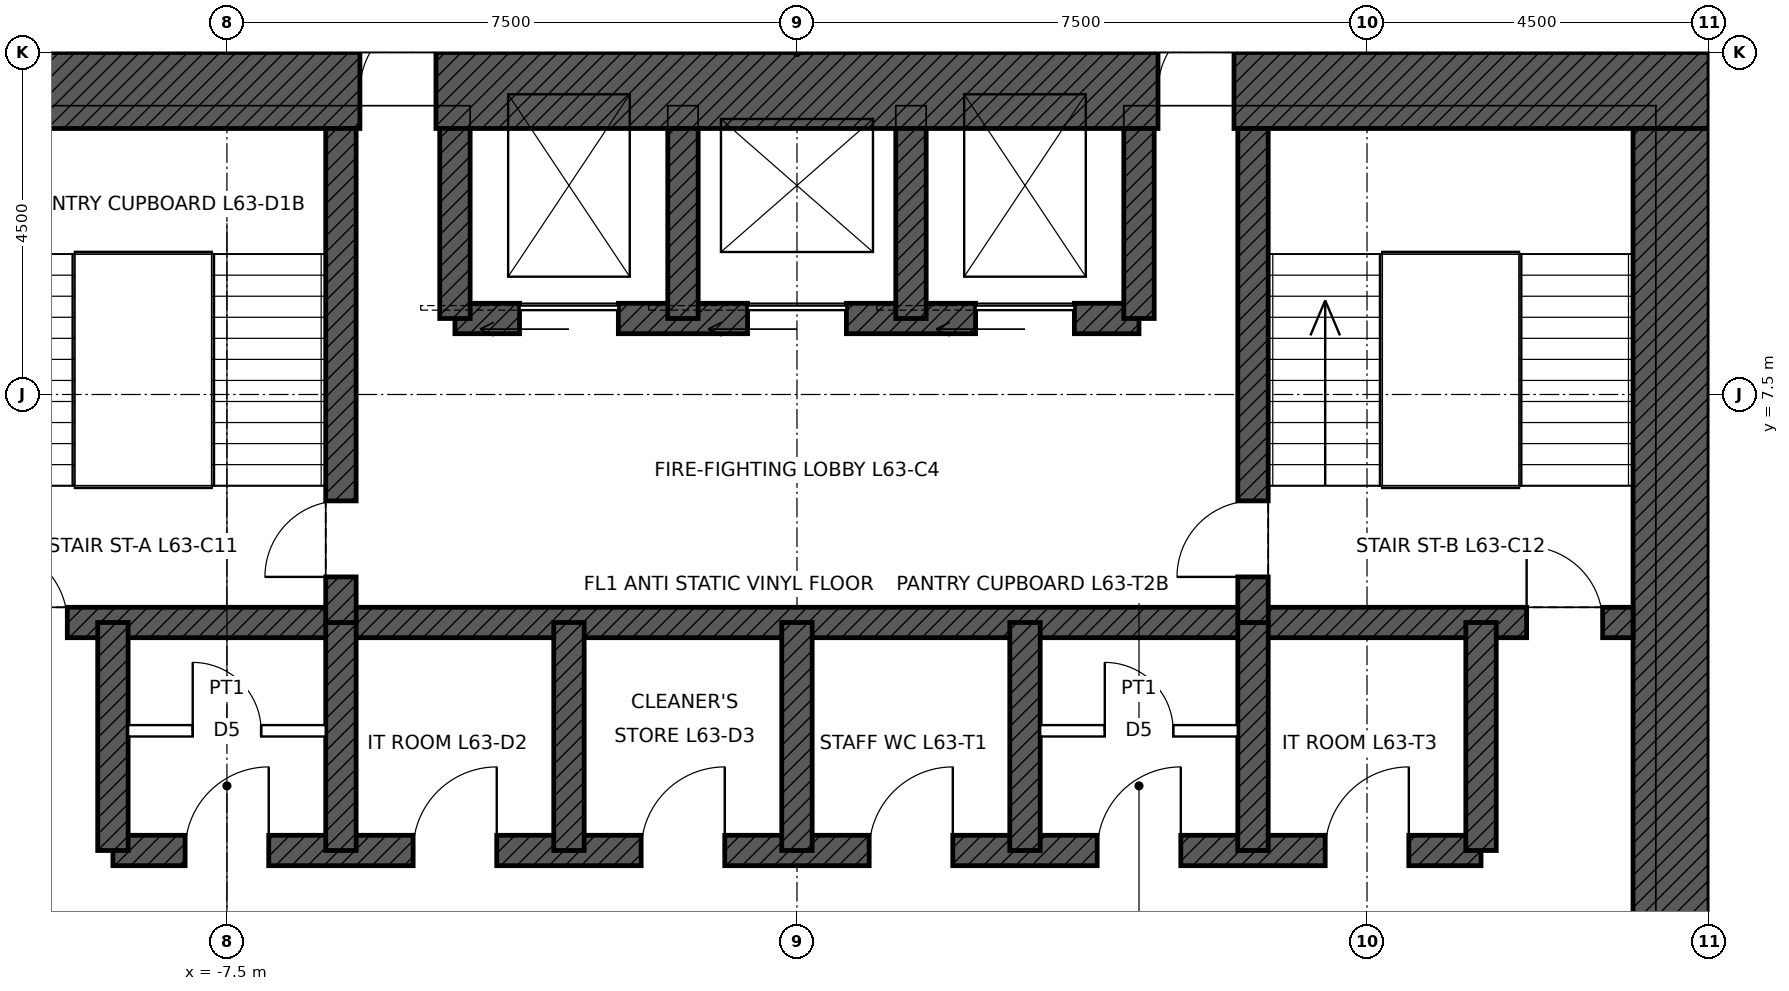
"""IFC4 building model, lengths in metres.
Left out: names, types, materials, properties, quantities, classifications, styles, units other than length and angle.
Written with IfcOpenShell. Run it as: python <this file> out.ifc"""

import sys

from ifc_helpers import new_model, si_unit, direction, frame, frame_2d, origin, place, context, subcontext, project, spatial, rectangle, extrude, element, fill, save


model = new_model("IFC4")
c1 = context("Model", 3, precision=1e-05, world=origin(), true_north=direction((0.0, 1.0)))
c2 = subcontext(c1, "Body", "Model", "MODEL_VIEW")
j1 = project(units=[si_unit("LENGTHUNIT", "METRE"), si_unit("PLANEANGLEUNIT", "RADIAN")], contexts=[c1])
p1 = place(None, origin())
s1 = spatial("IfcSite", under=j1, at=p1, CompositionType="ELEMENT")
p2 = place(p1, origin())
s2 = spatial("IfcBuilding", under=s1, at=p2, CompositionType="ELEMENT")
p3 = place(p2, frame((0.0, 0.0, 287.9)))
s3 = spatial("IfcBuildingStorey", under=s2, at=p3, CompositionType="ELEMENT", Elevation=287.9)
p4 = place(p3, frame((-12.0, 11.5, 0.0), z_axis=(0.0, 0.0, 1.0), x_axis=(1.0, 0.0, 0.0)))
e1 = element("IfcWall", 1, at=p4, inside=s3, PredefinedType="SHEAR", context=c2, shape_type="SweptSolid", body=[
    extrude(rectangle(XDim=24.0, YDim=1.0, at=frame_2d((12.0, 0.0))), origin(), (0.0, 0.0, 1.0), 4.0),
])
p5 = place(p4, frame((6.25, 0.0, 0.0)))
e2 = element("IfcOpeningElement", 2, at=p5, cuts=e1, PredefinedType="OPENING", context=c2, shape_type="SweptSolid", body=[
    extrude(rectangle(XDim=1.0, YDim=2.4, at=frame_2d((0.5, 1.2))), frame((0.0, 0.51, 0.0), z_axis=(0.0, -1.0, 0.0), x_axis=(1.0, 0.0, 0.0)), (0.0, 0.0, 1.0), 1.02),
])
p6 = place(p4, frame((16.75, 0.0, 0.0)))
e3 = element("IfcOpeningElement", 3, at=p6, cuts=e1, PredefinedType="OPENING", context=c2, shape_type="SweptSolid", body=[
    extrude(rectangle(XDim=1.0, YDim=2.4, at=frame_2d((0.5, 1.2))), frame((0.0, 0.51, 0.0), z_axis=(0.0, -1.0, 0.0), x_axis=(1.0, 0.0, 0.0)), (0.0, 0.0, 1.0), 1.02),
])
p7 = place(p3, frame((11.5, 11.0, 0.0), z_axis=(0.0, 0.0, 1.0), x_axis=(0.0, -1.0, 0.0)))
e4 = element("IfcWall", 4, at=p7, inside=s3, PredefinedType="SHEAR", context=c2, shape_type="SweptSolid", body=[
    extrude(rectangle(XDim=22.0, YDim=1.0, at=frame_2d((11.0, 0.0))), origin(), (0.0, 0.0, 1.0), 4.0),
])
p8 = place(p7, frame((10.5, 0.0, 0.0)))
e5 = element("IfcOpeningElement", 5, at=p8, cuts=e4, PredefinedType="OPENING", context=c2, shape_type="SweptSolid", body=[
    extrude(rectangle(XDim=1.0, YDim=2.4, at=frame_2d((0.5, 1.2))), frame((0.0, 0.51, 0.0), z_axis=(0.0, -1.0, 0.0), x_axis=(1.0, 0.0, 0.0)), (0.0, 0.0, 1.0), 1.02),
])
p9 = place(p3, frame((-11.0, 4.5, 0.0), z_axis=(0.0, 0.0, 1.0), x_axis=(1.0, 0.0, 0.0)))
e6 = element("IfcWall", 6, at=p9, inside=s3, PredefinedType="SHEAR", context=c2, shape_type="SweptSolid", body=[
    extrude(rectangle(XDim=22.0, YDim=0.4, at=frame_2d((11.0, 0.0))), origin(), (0.0, 0.0, 1.0), 4.0),
])
p10 = place(p9, frame((0.4, 0.0, 0.0)))
e7 = element("IfcOpeningElement", 7, at=p10, cuts=e6, PredefinedType="OPENING", context=c2, shape_type="SweptSolid", body=[
    extrude(rectangle(XDim=1.0, YDim=2.1, at=frame_2d((0.5, 1.05))), frame((0.0, 0.21, 0.0), z_axis=(0.0, -1.0, 0.0), x_axis=(1.0, 0.0, 0.0)), (0.0, 0.0, 1.0), 0.42),
])
p11 = place(p9, frame((20.6, 0.0, 0.0)))
e8 = element("IfcOpeningElement", 8, at=p11, cuts=e6, PredefinedType="OPENING", context=c2, shape_type="SweptSolid", body=[
    extrude(rectangle(XDim=1.0, YDim=2.1, at=frame_2d((0.5, 1.05))), frame((0.0, 0.21, 0.0), z_axis=(0.0, -1.0, 0.0), x_axis=(1.0, 0.0, 0.0)), (0.0, 0.0, 1.0), 0.42),
])
p12 = place(p3, frame((-9.0, 1.5, 0.0), z_axis=(0.0, 0.0, 1.0), x_axis=(1.0, 0.0, 0.0)))
e9 = element("IfcWall", 9, at=p12, inside=s3, PredefinedType="SHEAR", context=c2, shape_type="SweptSolid", body=[
    extrude(rectangle(XDim=18.0, YDim=0.4, at=frame_2d((9.0, 0.0))), origin(), (0.0, 0.0, 1.0), 4.0),
])
p13 = place(p12, frame((0.95, 0.0, 0.0)))
e10 = element("IfcOpeningElement", 10, at=p13, cuts=e9, PredefinedType="OPENING", context=c2, shape_type="SweptSolid", body=[
    extrude(rectangle(XDim=1.1, YDim=2.1, at=frame_2d((0.55, 1.05))), frame((0.0, 0.21, 0.0), z_axis=(0.0, -1.0, 0.0), x_axis=(1.0, 0.0, 0.0)), (0.0, 0.0, 1.0), 0.42),
])
p14 = place(p12, frame((3.95, 0.0, 0.0)))
e11 = element("IfcOpeningElement", 11, at=p14, cuts=e9, PredefinedType="OPENING", context=c2, shape_type="SweptSolid", body=[
    extrude(rectangle(XDim=1.1, YDim=2.1, at=frame_2d((0.55, 1.05))), frame((0.0, 0.21, 0.0), z_axis=(0.0, -1.0, 0.0), x_axis=(1.0, 0.0, 0.0)), (0.0, 0.0, 1.0), 0.42),
])
p15 = place(p12, frame((6.95, 0.0, 0.0)))
e12 = element("IfcOpeningElement", 12, at=p15, cuts=e9, PredefinedType="OPENING", context=c2, shape_type="SweptSolid", body=[
    extrude(rectangle(XDim=1.1, YDim=2.1, at=frame_2d((0.55, 1.05))), frame((0.0, 0.21, 0.0), z_axis=(0.0, -1.0, 0.0), x_axis=(1.0, 0.0, 0.0)), (0.0, 0.0, 1.0), 0.42),
])
p16 = place(p12, frame((9.95, 0.0, 0.0)))
e13 = element("IfcOpeningElement", 13, at=p16, cuts=e9, PredefinedType="OPENING", context=c2, shape_type="SweptSolid", body=[
    extrude(rectangle(XDim=1.1, YDim=2.1, at=frame_2d((0.55, 1.05))), frame((0.0, 0.21, 0.0), z_axis=(0.0, -1.0, 0.0), x_axis=(1.0, 0.0, 0.0)), (0.0, 0.0, 1.0), 0.42),
])
p17 = place(p12, frame((12.95, 0.0, 0.0)))
e14 = element("IfcOpeningElement", 14, at=p17, cuts=e9, PredefinedType="OPENING", context=c2, shape_type="SweptSolid", body=[
    extrude(rectangle(XDim=1.1, YDim=2.1, at=frame_2d((0.55, 1.05))), frame((0.0, 0.21, 0.0), z_axis=(0.0, -1.0, 0.0), x_axis=(1.0, 0.0, 0.0)), (0.0, 0.0, 1.0), 0.42),
])
p18 = place(p12, frame((15.95, 0.0, 0.0)))
e15 = element("IfcOpeningElement", 15, at=p18, cuts=e9, PredefinedType="OPENING", context=c2, shape_type="SweptSolid", body=[
    extrude(rectangle(XDim=1.1, YDim=2.1, at=frame_2d((0.55, 1.05))), frame((0.0, 0.21, 0.0), z_axis=(0.0, -1.0, 0.0), x_axis=(1.0, 0.0, 0.0)), (0.0, 0.0, 1.0), 0.42),
])
p19 = place(p3, frame((-4.5, 8.5, 0.0), z_axis=(0.0, 0.0, 1.0), x_axis=(1.0, 0.0, 0.0)))
e16 = element("IfcWall", 16, at=p19, inside=s3, PredefinedType="SHEAR", context=c2, shape_type="SweptSolid", body=[
    extrude(rectangle(XDim=9.0, YDim=0.4, at=frame_2d((4.5, 0.0))), origin(), (0.0, 0.0, 1.0), 4.0),
])
p20 = place(p19, frame((0.85, 0.0, 0.0)))
e17 = element("IfcOpeningElement", 17, at=p20, cuts=e16, PredefinedType="OPENING", context=c2, shape_type="SweptSolid", body=[
    extrude(rectangle(XDim=1.3, YDim=2.4, at=frame_2d((0.65, 1.2))), frame((0.0, 0.21, 0.0), z_axis=(0.0, -1.0, 0.0), x_axis=(1.0, 0.0, 0.0)), (0.0, 0.0, 1.0), 0.42),
])
p21 = place(p19, frame((6.85, 0.0, 0.0)))
e18 = element("IfcOpeningElement", 18, at=p21, cuts=e16, PredefinedType="OPENING", context=c2, shape_type="SweptSolid", body=[
    extrude(rectangle(XDim=1.3, YDim=2.4, at=frame_2d((0.65, 1.2))), frame((0.0, 0.21, 0.0), z_axis=(0.0, -1.0, 0.0), x_axis=(1.0, 0.0, 0.0)), (0.0, 0.0, 1.0), 0.42),
])
p22 = place(p19, frame((3.85, 0.0, 0.0)))
e19 = element("IfcOpeningElement", 19, at=p22, cuts=e16, PredefinedType="OPENING", context=c2, shape_type="SweptSolid", body=[
    extrude(rectangle(XDim=1.3, YDim=2.4, at=frame_2d((0.65, 1.2))), frame((0.0, 0.21, 0.0), z_axis=(0.0, -1.0, 0.0), x_axis=(1.0, 0.0, 0.0)), (0.0, 0.0, 1.0), 0.42),
])
for number, where, z_axis, x_axis in (
    (20, (-9.0, 1.5, 0.0), (0.0, 0.0, 1.0), (0.0, 1.0, 0.0)),
    (21, (9.0, 1.5, 0.0), (0.0, 0.0, 1.0), (0.0, 1.0, 0.0)),
    (22, (-6.0, 1.5, 0.0), (0.0, 0.0, 1.0), (0.0, 1.0, 0.0)),
    (23, (-3.0, 1.5, 0.0), (0.0, 0.0, 1.0), (0.0, 1.0, 0.0)),
    (24, (0.0, 1.5, 0.0), (0.0, 0.0, 1.0), (0.0, 1.0, 0.0)),
    (25, (3.0, 1.5, 0.0), (0.0, 0.0, 1.0), (0.0, 1.0, 0.0)),
    (26, (6.0, 1.5, 0.0), (0.0, 0.0, 1.0), (0.0, 1.0, 0.0)),
):
    element("IfcWall", number, at=place(p3, frame(where, z_axis=z_axis, x_axis=x_axis)), inside=s3, PredefinedType="SHEAR", context=c2, shape_type="SweptSolid", body=[
        extrude(rectangle(XDim=3.0, YDim=0.4, at=frame_2d((1.5, 0.0))), origin(), (0.0, 0.0, 1.0), 4.0),
    ])
p23 = place(p3, frame((-6.0, 4.5, 0.0), z_axis=(0.0, 0.0, 1.0), x_axis=(0.0, 1.0, 0.0)))
e27 = element("IfcWall", 27, at=p23, inside=s3, PredefinedType="SHEAR", context=c2, shape_type="SweptSolid", body=[
    extrude(rectangle(XDim=6.5, YDim=0.4, at=frame_2d((3.25, 0.0))), origin(), (0.0, 0.0, 1.0), 4.0),
])
p24 = place(p23, frame((0.6, 0.0, 0.0)))
e28 = element("IfcOpeningElement", 28, at=p24, cuts=e27, PredefinedType="OPENING", context=c2, shape_type="SweptSolid", body=[
    extrude(rectangle(XDim=1.0, YDim=2.1, at=frame_2d((0.5, 1.05))), frame((0.0, 0.21, 0.0), z_axis=(0.0, -1.0, 0.0), x_axis=(1.0, 0.0, 0.0)), (0.0, 0.0, 1.0), 0.42),
])
p25 = place(p3, frame((6.0, 4.5, 0.0), z_axis=(0.0, 0.0, 1.0), x_axis=(0.0, 1.0, 0.0)))
e29 = element("IfcWall", 29, at=p25, inside=s3, PredefinedType="SHEAR", context=c2, shape_type="SweptSolid", body=[
    extrude(rectangle(XDim=6.5, YDim=0.4, at=frame_2d((3.25, 0.0))), origin(), (0.0, 0.0, 1.0), 4.0),
])
p26 = place(p25, frame((0.6, 0.0, 0.0)))
e30 = element("IfcOpeningElement", 30, at=p26, cuts=e29, PredefinedType="OPENING", context=c2, shape_type="SweptSolid", body=[
    extrude(rectangle(XDim=1.0, YDim=2.1, at=frame_2d((0.5, 1.05))), frame((0.0, 0.21, 0.0), z_axis=(0.0, -1.0, 0.0), x_axis=(1.0, 0.0, 0.0)), (0.0, 0.0, 1.0), 0.42),
])
for number, where, z_axis, x_axis in (
    (31, (-4.5, 8.5, 0.0), (0.0, 0.0, 1.0), (0.0, 1.0, 0.0)),
    (32, (4.5, 8.5, 0.0), (0.0, 0.0, 1.0), (0.0, 1.0, 0.0)),
    (33, (-1.5, 8.5, 0.0), (0.0, 0.0, 1.0), (0.0, 1.0, 0.0)),
    (34, (1.5, 8.5, 0.0), (0.0, 0.0, 1.0), (0.0, 1.0, 0.0)),
):
    element("IfcWall", number, at=place(p3, frame(where, z_axis=z_axis, x_axis=x_axis)), inside=s3, PredefinedType="SHEAR", context=c2, shape_type="SweptSolid", body=[
        extrude(rectangle(XDim=2.5, YDim=0.4, at=frame_2d((1.25, 0.0))), origin(), (0.0, 0.0, 1.0), 4.0),
    ])
p27 = place(p3, frame((-8.8, 3.075, 0.0), z_axis=(0.0, 0.0, 1.0), x_axis=(1.0, 0.0, 0.0)))
e35 = element("IfcWall", 35, at=p27, inside=s3, PredefinedType="PARTITIONING", context=c2, shape_type="SweptSolid", body=[
    extrude(rectangle(XDim=2.6, YDim=0.15, at=frame_2d((1.3, 0.0))), origin(), (0.0, 0.0, 1.0), 3.75),
])
p28 = place(p27, frame((0.85, 0.0, 0.0)))
e36 = element("IfcOpeningElement", 36, at=p28, cuts=e35, PredefinedType="OPENING", context=c2, shape_type="SweptSolid", body=[
    extrude(rectangle(XDim=0.9, YDim=2.1, at=frame_2d((0.45, 1.05))), frame((0.0, 0.085, 0.0), z_axis=(0.0, -1.0, 0.0), x_axis=(1.0, 0.0, 0.0)), (0.0, 0.0, 1.0), 0.17),
])
p29 = place(p3, frame((3.2, 3.075, 0.0), z_axis=(0.0, 0.0, 1.0), x_axis=(1.0, 0.0, 0.0)))
e37 = element("IfcWall", 37, at=p29, inside=s3, PredefinedType="PARTITIONING", context=c2, shape_type="SweptSolid", body=[
    extrude(rectangle(XDim=2.6, YDim=0.15, at=frame_2d((1.3, 0.0))), origin(), (0.0, 0.0, 1.0), 3.75),
])
p30 = place(p29, frame((0.85, 0.0, 0.0)))
e38 = element("IfcOpeningElement", 38, at=p30, cuts=e37, PredefinedType="OPENING", context=c2, shape_type="SweptSolid", body=[
    extrude(rectangle(XDim=0.9, YDim=2.1, at=frame_2d((0.45, 1.05))), frame((0.0, 0.085, 0.0), z_axis=(0.0, -1.0, 0.0), x_axis=(1.0, 0.0, 0.0)), (0.0, 0.0, 1.0), 0.17),
])
p31 = place(p10, origin())
e39 = element("IfcDoor", 39, at=p31, inside=s3, OperationType="SINGLE_SWING_LEFT", PredefinedType="DOOR", context=c2, shape_type="SweptSolid", body=[
    extrude(rectangle(XDim=1.0, YDim=2.1, at=frame_2d((0.5, 1.05))), frame((0.0, 0.025, 0.0), z_axis=(0.0, -1.0, 0.0), x_axis=(1.0, 0.0, 0.0)), (0.0, 0.0, 1.0), 0.05),
])
fill(e7, e39)
p32 = place(p11, origin())
e40 = element("IfcDoor", 40, at=p32, inside=s3, OperationType="SINGLE_SWING_LEFT", PredefinedType="DOOR", context=c2, shape_type="SweptSolid", body=[
    extrude(rectangle(XDim=1.0, YDim=2.1, at=frame_2d((0.5, 1.05))), frame((0.0, 0.025, 0.0), z_axis=(0.0, -1.0, 0.0), x_axis=(1.0, 0.0, 0.0)), (0.0, 0.0, 1.0), 0.05),
])
fill(e8, e40)
p33 = place(p24, origin())
e41 = element("IfcDoor", 41, at=p33, inside=s3, OperationType="SINGLE_SWING_LEFT", PredefinedType="DOOR", context=c2, shape_type="SweptSolid", body=[
    extrude(rectangle(XDim=1.0, YDim=2.1, at=frame_2d((0.5, 1.05))), frame((0.0, 0.025, 0.0), z_axis=(0.0, -1.0, 0.0), x_axis=(1.0, 0.0, 0.0)), (0.0, 0.0, 1.0), 0.05),
])
fill(e28, e41)
p34 = place(p26, origin())
e42 = element("IfcDoor", 42, at=p34, inside=s3, OperationType="SINGLE_SWING_LEFT", PredefinedType="DOOR", context=c2, shape_type="SweptSolid", body=[
    extrude(rectangle(XDim=1.0, YDim=2.1, at=frame_2d((0.5, 1.05))), frame((0.0, 0.025, 0.0), z_axis=(0.0, -1.0, 0.0), x_axis=(1.0, 0.0, 0.0)), (0.0, 0.0, 1.0), 0.05),
])
fill(e30, e42)
p35 = place(p5, origin())
e43 = element("IfcDoor", 43, at=p35, inside=s3, OperationType="SINGLE_SWING_RIGHT", PredefinedType="DOOR", context=c2, shape_type="SweptSolid", body=[
    extrude(rectangle(XDim=1.0, YDim=2.4, at=frame_2d((0.5, 1.2))), frame((0.0, 0.485, 0.0), z_axis=(0.0, -1.0, 0.0), x_axis=(1.0, 0.0, 0.0)), (0.0, 0.0, 1.0), 0.05),
])
fill(e2, e43)
p36 = place(p6, origin())
e44 = element("IfcDoor", 44, at=p36, inside=s3, OperationType="SINGLE_SWING_RIGHT", PredefinedType="DOOR", context=c2, shape_type="SweptSolid", body=[
    extrude(rectangle(XDim=1.0, YDim=2.4, at=frame_2d((0.5, 1.2))), frame((0.0, 0.485, 0.0), z_axis=(0.0, -1.0, 0.0), x_axis=(1.0, 0.0, 0.0)), (0.0, 0.0, 1.0), 0.05),
])
fill(e3, e44)
p37 = place(p20, origin())
e45 = element("IfcDoor", 45, at=p37, inside=s3, OperationType="SLIDING_TO_LEFT", PredefinedType="DOOR", context=c2, shape_type="SweptSolid", body=[
    extrude(rectangle(XDim=1.3, YDim=2.4, at=frame_2d((0.65, 1.2))), frame((0.0, 0.025, 0.0), z_axis=(0.0, -1.0, 0.0), x_axis=(1.0, 0.0, 0.0)), (0.0, 0.0, 1.0), 0.05),
])
fill(e17, e45)
p38 = place(p21, origin())
e46 = element("IfcDoor", 46, at=p38, inside=s3, OperationType="SLIDING_TO_LEFT", PredefinedType="DOOR", context=c2, shape_type="SweptSolid", body=[
    extrude(rectangle(XDim=1.3, YDim=2.4, at=frame_2d((0.65, 1.2))), frame((0.0, 0.025, 0.0), z_axis=(0.0, -1.0, 0.0), x_axis=(1.0, 0.0, 0.0)), (0.0, 0.0, 1.0), 0.05),
])
fill(e18, e46)
p39 = place(p22, origin())
e47 = element("IfcDoor", 47, at=p39, inside=s3, OperationType="SLIDING_TO_LEFT", PredefinedType="DOOR", context=c2, shape_type="SweptSolid", body=[
    extrude(rectangle(XDim=1.3, YDim=2.4, at=frame_2d((0.65, 1.2))), frame((0.0, 0.025, 0.0), z_axis=(0.0, -1.0, 0.0), x_axis=(1.0, 0.0, 0.0)), (0.0, 0.0, 1.0), 0.05),
])
fill(e19, e47)
p40 = place(p13, origin())
e48 = element("IfcDoor", 48, at=p40, inside=s3, OperationType="SINGLE_SWING_RIGHT", PredefinedType="DOOR", context=c2, shape_type="SweptSolid", body=[
    extrude(rectangle(XDim=1.1, YDim=2.1, at=frame_2d((0.55, 1.05))), frame((0.0, 0.025, 0.0), z_axis=(0.0, -1.0, 0.0), x_axis=(1.0, 0.0, 0.0)), (0.0, 0.0, 1.0), 0.05),
])
fill(e10, e48)
p41 = place(p28, origin())
e49 = element("IfcDoor", 49, at=p41, inside=s3, OperationType="SINGLE_SWING_LEFT", PredefinedType="DOOR", context=c2, shape_type="SweptSolid", body=[
    extrude(rectangle(XDim=0.9, YDim=2.1, at=frame_2d((0.45, 1.05))), frame((0.0, 0.025, 0.0), z_axis=(0.0, -1.0, 0.0), x_axis=(1.0, 0.0, 0.0)), (0.0, 0.0, 1.0), 0.05),
])
fill(e36, e49)
p42 = place(p14, origin())
e50 = element("IfcDoor", 50, at=p42, inside=s3, OperationType="SINGLE_SWING_RIGHT", PredefinedType="DOOR", context=c2, shape_type="SweptSolid", body=[
    extrude(rectangle(XDim=1.1, YDim=2.1, at=frame_2d((0.55, 1.05))), frame((0.0, 0.025, 0.0), z_axis=(0.0, -1.0, 0.0), x_axis=(1.0, 0.0, 0.0)), (0.0, 0.0, 1.0), 0.05),
])
fill(e11, e50)
p43 = place(p15, origin())
e51 = element("IfcDoor", 51, at=p43, inside=s3, OperationType="SINGLE_SWING_RIGHT", PredefinedType="DOOR", context=c2, shape_type="SweptSolid", body=[
    extrude(rectangle(XDim=1.1, YDim=2.1, at=frame_2d((0.55, 1.05))), frame((0.0, 0.025, 0.0), z_axis=(0.0, -1.0, 0.0), x_axis=(1.0, 0.0, 0.0)), (0.0, 0.0, 1.0), 0.05),
])
fill(e12, e51)
p44 = place(p16, origin())
e52 = element("IfcDoor", 52, at=p44, inside=s3, OperationType="SINGLE_SWING_RIGHT", PredefinedType="DOOR", context=c2, shape_type="SweptSolid", body=[
    extrude(rectangle(XDim=1.1, YDim=2.1, at=frame_2d((0.55, 1.05))), frame((0.0, 0.025, 0.0), z_axis=(0.0, -1.0, 0.0), x_axis=(1.0, 0.0, 0.0)), (0.0, 0.0, 1.0), 0.05),
])
fill(e13, e52)
p45 = place(p17, origin())
e53 = element("IfcDoor", 53, at=p45, inside=s3, OperationType="SINGLE_SWING_RIGHT", PredefinedType="DOOR", context=c2, shape_type="SweptSolid", body=[
    extrude(rectangle(XDim=1.1, YDim=2.1, at=frame_2d((0.55, 1.05))), frame((0.0, 0.025, 0.0), z_axis=(0.0, -1.0, 0.0), x_axis=(1.0, 0.0, 0.0)), (0.0, 0.0, 1.0), 0.05),
])
fill(e14, e53)
p46 = place(p30, origin())
e54 = element("IfcDoor", 54, at=p46, inside=s3, OperationType="SINGLE_SWING_LEFT", PredefinedType="DOOR", context=c2, shape_type="SweptSolid", body=[
    extrude(rectangle(XDim=0.9, YDim=2.1, at=frame_2d((0.45, 1.05))), frame((0.0, 0.025, 0.0), z_axis=(0.0, -1.0, 0.0), x_axis=(1.0, 0.0, 0.0)), (0.0, 0.0, 1.0), 0.05),
])
fill(e38, e54)
p47 = place(p18, origin())
e55 = element("IfcDoor", 55, at=p47, inside=s3, OperationType="SINGLE_SWING_RIGHT", PredefinedType="DOOR", context=c2, shape_type="SweptSolid", body=[
    extrude(rectangle(XDim=1.1, YDim=2.1, at=frame_2d((0.55, 1.05))), frame((0.0, 0.025, 0.0), z_axis=(0.0, -1.0, 0.0), x_axis=(1.0, 0.0, 0.0)), (0.0, 0.0, 1.0), 0.05),
])
fill(e15, e55)
save(model, sys.argv[1])
